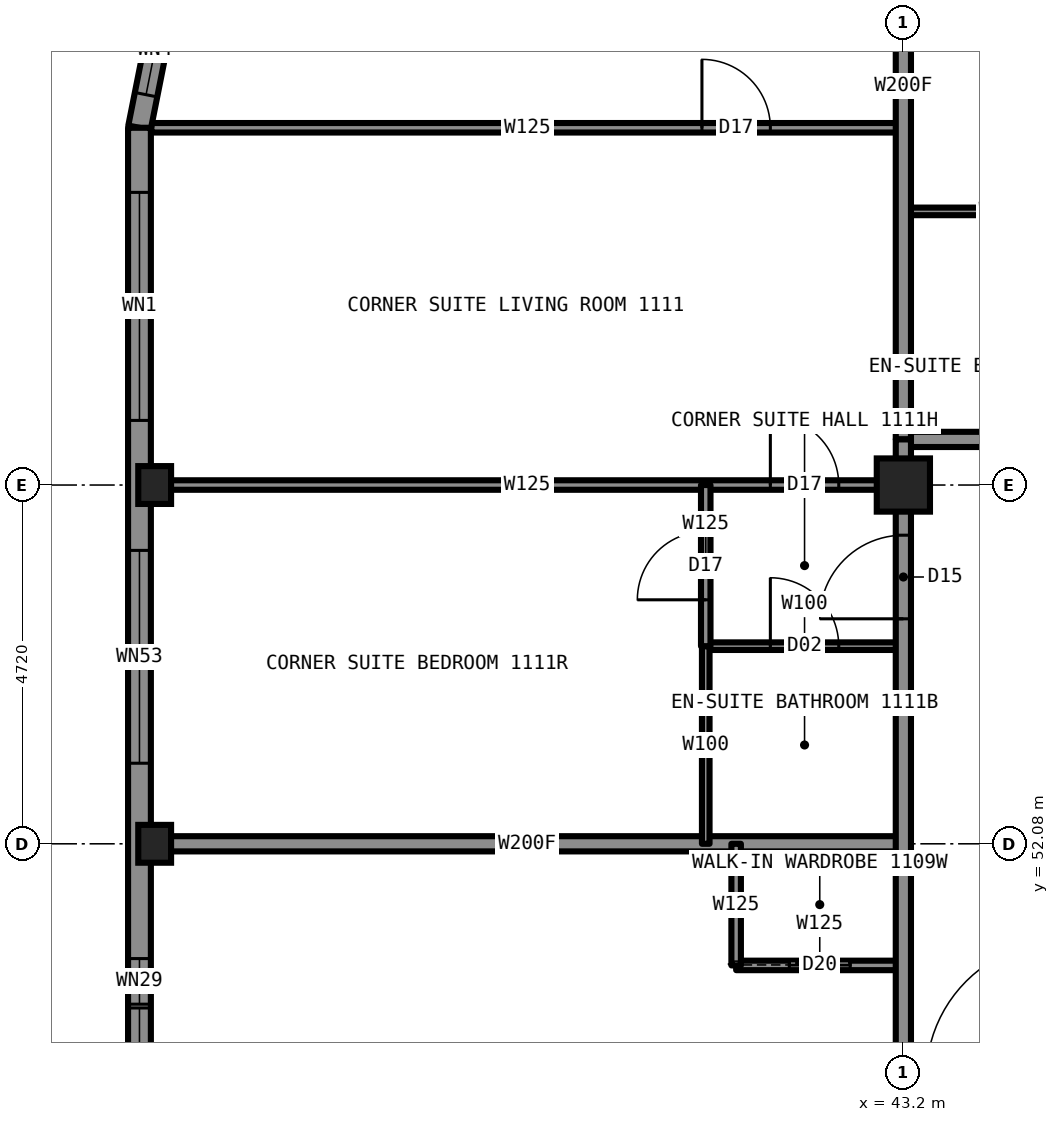
"""IFC4 building model, lengths in metres.
Left out: names, types, materials, properties, quantities, classifications, styles, units other than length and angle.
Written with IfcOpenShell. Run it as: python <this file> out.ifc"""

import sys

from ifc_helpers import new_model, si_unit, direction, frame, frame_2d, origin, origin_2d, place, context, subcontext, project, spatial, rectangle, hollow_rectangle, i_section, extrude, element, fill, save


model = new_model("IFC4")
c1 = context("Model", 3, precision=1e-05, world=origin(), true_north=direction((0.0, 1.0)))
c2 = subcontext(c1, "Body", "Model", "MODEL_VIEW")
j1 = project(units=[si_unit("LENGTHUNIT", "METRE"), si_unit("PLANEANGLEUNIT", "RADIAN")], contexts=[c1])
p1 = place(None, origin())
s1 = spatial("IfcSite", under=j1, at=p1, CompositionType="ELEMENT")
p2 = place(p1, origin())
s2 = spatial("IfcBuilding", under=s1, at=p2, CompositionType="ELEMENT")
p3 = place(p2, frame((0.0, 0.0, 39.0)))
s3 = spatial("IfcBuildingStorey", under=s2, at=p3, CompositionType="ELEMENT", Elevation=39.0)
for number, where, z_axis, x_axis in (
    (1, (33.35, 52.08, 0.0), (0.0, 0.0, 1.0), (1.0, 0.0, 0.0)),
    (2, (33.35, 56.8, 0.0), (0.0, 0.0, 1.0), (1.0, 0.0, 0.0)),
):
    element("IfcColumn", number, at=place(p3, frame(where, z_axis=z_axis, x_axis=x_axis)), inside=s3, PredefinedType="COLUMN", context=c2, shape_type="SweptSolid", body=[
        extrude(i_section(OverallWidth=0.432, OverallDepth=0.498, WebThickness=0.056, FlangeThickness=0.089, at=origin_2d()), origin(), (0.0, 0.0, 1.0), 3.5),
    ])
p4 = place(p3, frame((43.2, 56.8, 0.0), z_axis=(0.0, 0.0, 1.0), x_axis=(1.0, 0.0, 0.0)))
e3 = element("IfcColumn", 3, at=p4, inside=s3, PredefinedType="COLUMN", context=c2, shape_type="SweptSolid", body=[
    extrude(hollow_rectangle(XDim=0.7, YDim=0.7, WallThickness=0.06, at=origin_2d()), origin(), (0.0, 0.0, 1.0), 3.5),
])
p5 = place(p3, frame((33.3, 56.8, 0.0), z_axis=(0.0, 0.0, 1.0), x_axis=(1.0, 0.0, 0.0)))
e4 = element("IfcWall", 4, at=p5, inside=s3, PredefinedType="PARTITIONING", context=c2, shape_type="SweptSolid", body=[
    extrude(rectangle(XDim=9.9, YDim=0.125, at=frame_2d((4.95, 0.0))), origin(), (0.0, 0.0, 1.0), 2.573),
])
p6 = place(p5, frame((8.15, 0.0, 0.0)))
e5 = element("IfcOpeningElement", 5, at=p6, cuts=e4, PredefinedType="OPENING", context=c2, shape_type="SweptSolid", body=[
    extrude(rectangle(XDim=0.9, YDim=2.2, at=frame_2d((0.45, 1.1))), frame((0.0, 0.073, 0.0), z_axis=(0.0, -1.0, 0.0), x_axis=(1.0, 0.0, 0.0)), (0.0, 0.0, 1.0), 0.145),
])
p7 = place(p3, frame((43.2, 57.4, 0.0), z_axis=(0.0, 0.0, 1.0), x_axis=(1.0, 0.0, 0.0)))
e6 = element("IfcWall", 6, at=p7, inside=s3, PredefinedType="PARTITIONING", context=c2, shape_type="SweptSolid", body=[
    extrude(rectangle(XDim=23.6, YDim=0.2, at=frame_2d((11.8, 0.0))), origin(), (0.0, 0.0, 1.0), 3.33),
])
p8 = place(p7, frame((3.0, 0.0, 0.0)))
e7 = element("IfcOpeningElement", 7, at=p8, cuts=e6, PredefinedType="OPENING", context=c2, shape_type="SweptSolid", body=[
    extrude(rectangle(XDim=1.0, YDim=2.2, at=frame_2d((0.5, 1.1))), frame((0.0, 0.11, 0.0), z_axis=(0.0, -1.0, 0.0), x_axis=(1.0, 0.0, 0.0)), (0.0, 0.0, 1.0), 0.22),
])
p9 = place(p7, frame((11.29, 0.0, 0.0)))
e8 = element("IfcOpeningElement", 8, at=p9, cuts=e6, PredefinedType="OPENING", context=c2, shape_type="SweptSolid", body=[
    extrude(rectangle(XDim=1.1, YDim=2.2, at=frame_2d((0.55, 1.1))), frame((0.0, 0.11, 0.0), z_axis=(0.0, -1.0, 0.0), x_axis=(1.0, 0.0, 0.0)), (0.0, 0.0, 1.0), 0.22),
])
p10 = place(p3, frame((43.2, 60.4, 0.0), z_axis=(0.0, 0.0, 1.0), x_axis=(1.0, 0.0, 0.0)))
e9 = element("IfcWall", 9, at=p10, inside=s3, PredefinedType="PARTITIONING", context=c2, shape_type="SweptSolid", body=[
    extrude(rectangle(XDim=2.6, YDim=0.1, at=frame_2d((1.3, 0.0))), origin(), (0.0, 0.0, 1.0), 3.33),
])
p11 = place(p3, frame((33.306, 61.5, 0.0), z_axis=(0.0, 0.0, 1.0), x_axis=(1.0, 0.0, 0.0)))
e10 = element("IfcWall", 10, at=p11, inside=s3, PredefinedType="PARTITIONING", context=c2, shape_type="SweptSolid", body=[
    extrude(rectangle(XDim=9.894, YDim=0.125, at=frame_2d((4.947, 0.0))), origin(), (0.0, 0.0, 1.0), 3.33),
])
p12 = place(p11, frame((7.244, 0.0, 0.0)))
e11 = element("IfcOpeningElement", 11, at=p12, cuts=e10, PredefinedType="OPENING", context=c2, shape_type="SweptSolid", body=[
    extrude(rectangle(XDim=0.9, YDim=2.2, at=frame_2d((0.45, 1.1))), frame((0.0, 0.073, 0.0), z_axis=(0.0, -1.0, 0.0), x_axis=(1.0, 0.0, 0.0)), (0.0, 0.0, 1.0), 0.145),
])
p13 = place(p3, frame((41.0, 50.48, 0.0), z_axis=(0.0, 0.0, 1.0), x_axis=(1.0, 0.0, 0.0)))
e12 = element("IfcWall", 12, at=p13, inside=s3, PredefinedType="PARTITIONING", context=c2, shape_type="SweptSolid", body=[
    extrude(rectangle(XDim=2.2, YDim=0.125, at=frame_2d((1.1, 0.0))), origin(), (0.0, 0.0, 1.0), 3.33),
])
p14 = place(p13, frame((0.7, 0.0, 0.0)))
e13 = element("IfcOpeningElement", 13, at=p14, cuts=e12, PredefinedType="OPENING", context=c2, shape_type="SweptSolid", body=[
    extrude(rectangle(XDim=0.8, YDim=2.1, at=frame_2d((0.4, 1.05))), frame((0.0, 0.073, 0.0), z_axis=(0.0, -1.0, 0.0), x_axis=(1.0, 0.0, 0.0)), (0.0, 0.0, 1.0), 0.145),
])
p15 = place(p3, frame((33.3, 52.08, 0.0), z_axis=(0.0, 0.0, 1.0), x_axis=(1.0, 0.0, 0.0)))
e14 = element("IfcWall", 14, at=p15, inside=s3, PredefinedType="PARTITIONING", context=c2, shape_type="SweptSolid", body=[
    extrude(rectangle(XDim=9.9, YDim=0.2, at=frame_2d((4.95, 0.0))), origin(), (0.0, 0.0, 1.0), 2.573),
])
p16 = place(p3, frame((40.6, 54.68, 0.0), z_axis=(0.0, 0.0, 1.0), x_axis=(1.0, 0.0, 0.0)))
e15 = element("IfcWall", 15, at=p16, inside=s3, PredefinedType="PARTITIONING", context=c2, shape_type="SweptSolid", body=[
    extrude(rectangle(XDim=2.6, YDim=0.1, at=frame_2d((1.3, 0.0))), origin(), (0.0, 0.0, 1.0), 3.33),
])
p17 = place(p16, frame((0.85, 0.0, 0.0)))
e16 = element("IfcOpeningElement", 16, at=p17, cuts=e15, PredefinedType="OPENING", context=c2, shape_type="SweptSolid", body=[
    extrude(rectangle(XDim=0.9, YDim=2.1, at=frame_2d((0.45, 1.05))), frame((0.0, 0.06, 0.0), z_axis=(0.0, -1.0, 0.0), x_axis=(1.0, 0.0, 0.0)), (0.0, 0.0, 1.0), 0.12),
])
p18 = place(p3, frame((43.2, 33.2, 0.0), z_axis=(0.0, 0.0, 1.0), x_axis=(0.0, 1.0, 0.0)))
e17 = element("IfcWall", 17, at=p18, inside=s3, PredefinedType="PARTITIONING", context=c2, shape_type="SweptSolid", body=[
    extrude(rectangle(XDim=23.58, YDim=0.2, at=frame_2d((11.79, 0.0))), origin(), (0.0, 0.0, 1.0), 3.33),
])
p19 = place(p18, frame((7.27, 0.0, 0.0)))
e18 = element("IfcOpeningElement", 18, at=p19, cuts=e17, PredefinedType="OPENING", context=c2, shape_type="SweptSolid", body=[
    extrude(rectangle(XDim=1.0, YDim=2.2, at=frame_2d((0.5, 1.1))), frame((0.0, 0.11, 0.0), z_axis=(0.0, -1.0, 0.0), x_axis=(1.0, 0.0, 0.0)), (0.0, 0.0, 1.0), 0.22),
])
p20 = place(p18, frame((12.44, 0.0, 0.0)))
e19 = element("IfcOpeningElement", 19, at=p20, cuts=e17, PredefinedType="OPENING", context=c2, shape_type="SweptSolid", body=[
    extrude(rectangle(XDim=1.0, YDim=2.2, at=frame_2d((0.5, 1.1))), frame((0.0, 0.11, 0.0), z_axis=(0.0, -1.0, 0.0), x_axis=(1.0, 0.0, 0.0)), (0.0, 0.0, 1.0), 0.22),
])
p21 = place(p18, frame((21.84, 0.0, 0.0)))
e20 = element("IfcOpeningElement", 20, at=p21, cuts=e17, PredefinedType="OPENING", context=c2, shape_type="SweptSolid", body=[
    extrude(rectangle(XDim=1.1, YDim=2.2, at=frame_2d((0.55, 1.1))), frame((0.0, 0.11, 0.0), z_axis=(0.0, -1.0, 0.0), x_axis=(1.0, 0.0, 0.0)), (0.0, 0.0, 1.0), 0.22),
])
p22 = place(p18, frame((0.66, 0.0, 0.0)))
e21 = element("IfcOpeningElement", 21, at=p22, cuts=e17, PredefinedType="OPENING", context=c2, shape_type="SweptSolid", body=[
    extrude(rectangle(XDim=1.1, YDim=2.2, at=frame_2d((0.55, 1.1))), frame((0.0, 0.11, 0.0), z_axis=(0.0, -1.0, 0.0), x_axis=(1.0, 0.0, 0.0)), (0.0, 0.0, 1.0), 0.22),
])
p23 = place(p3, frame((43.2, 57.4, 0.0), z_axis=(0.0, 0.0, 1.0), x_axis=(0.0, 1.0, 0.0)))
e22 = element("IfcWall", 22, at=p23, inside=s3, PredefinedType="PARTITIONING", context=c2, shape_type="SweptSolid", body=[
    extrude(rectangle(XDim=9.3, YDim=0.2, at=frame_2d((4.65, 0.0))), origin(), (0.0, 0.0, 1.0), 2.573),
])
p24 = place(p3, frame((41.0, 50.48, 0.0), z_axis=(0.0, 0.0, 1.0), x_axis=(0.0, 1.0, 0.0)))
e23 = element("IfcWall", 23, at=p24, inside=s3, PredefinedType="PARTITIONING", context=c2, shape_type="SweptSolid", body=[
    extrude(rectangle(XDim=1.6, YDim=0.125, at=frame_2d((0.8, 0.0))), origin(), (0.0, 0.0, 1.0), 3.33),
])
p25 = place(p3, frame((40.6, 52.08, 0.0), z_axis=(0.0, 0.0, 1.0), x_axis=(0.0, 1.0, 0.0)))
e24 = element("IfcWall", 24, at=p25, inside=s3, PredefinedType="PARTITIONING", context=c2, shape_type="SweptSolid", body=[
    extrude(rectangle(XDim=2.6, YDim=0.1, at=frame_2d((1.3, 0.0))), origin(), (0.0, 0.0, 1.0), 3.33),
])
p26 = place(p3, frame((40.6, 54.68, 0.0), z_axis=(0.0, 0.0, 1.0), x_axis=(0.0, 1.0, 0.0)))
e25 = element("IfcWall", 25, at=p26, inside=s3, PredefinedType="PARTITIONING", context=c2, shape_type="SweptSolid", body=[
    extrude(rectangle(XDim=2.12, YDim=0.125, at=frame_2d((1.06, 0.0))), origin(), (0.0, 0.0, 1.0), 3.33),
])
p27 = place(p26, frame((0.61, 0.0, 0.0)))
e26 = element("IfcOpeningElement", 26, at=p27, cuts=e25, PredefinedType="OPENING", context=c2, shape_type="SweptSolid", body=[
    extrude(rectangle(XDim=0.9, YDim=2.2, at=frame_2d((0.45, 1.1))), frame((0.0, 0.073, 0.0), z_axis=(0.0, -1.0, 0.0), x_axis=(1.0, 0.0, 0.0)), (0.0, 0.0, 1.0), 0.145),
])
p28 = place(p3, frame((33.557, 63.547, 0.0), z_axis=(0.0, 0.0, 1.0), x_axis=(-0.195081421501, -0.980787050784, 0.0)))
e27 = element("IfcWall", 27, at=p28, inside=s3, PredefinedType="SOLIDWALL", context=c2, shape_type="SweptSolid", body=[
    extrude(rectangle(XDim=2.087, YDim=0.3, at=frame_2d((1.044, 0.0))), origin(), (0.0, 0.0, 1.0), 3.33),
])
p29 = place(p28, frame((0.444, 0.0, 0.5)))
e28 = element("IfcOpeningElement", 28, at=p29, cuts=e27, PredefinedType="OPENING", context=c2, shape_type="SweptSolid", body=[
    extrude(rectangle(XDim=1.2, YDim=2.0, at=frame_2d((0.6, 1.0))), frame((0.0, 0.16, 0.0), z_axis=(0.0, -1.0, 0.0), x_axis=(1.0, 0.0, 0.0)), (0.0, 0.0, 1.0), 0.32),
])
p30 = place(p3, frame((33.15, 61.5, 0.0), z_axis=(0.0, 0.0, 1.0), x_axis=(0.0, -1.0, 0.0)))
e29 = element("IfcWall", 29, at=p30, inside=s3, PredefinedType="SOLIDWALL", context=c2, shape_type="SweptSolid", body=[
    extrude(rectangle(XDim=33.0, YDim=0.3, at=frame_2d((16.5, 0.0))), origin(), (0.0, 0.0, 1.0), 2.83),
])
p31 = place(p30, frame((0.85, 0.0, 0.5)))
e30 = element("IfcOpeningElement", 30, at=p31, cuts=e29, PredefinedType="OPENING", context=c2, shape_type="SweptSolid", body=[
    extrude(rectangle(XDim=2.5, YDim=2.0, at=frame_2d((1.25, 1.0))), frame((0.0, 0.16, 0.0), z_axis=(0.0, -1.0, 0.0), x_axis=(1.0, 0.0, 0.0)), (0.0, 0.0, 1.0), 0.32),
])
p32 = place(p30, frame((6.61, 0.0, 0.5)))
e31 = element("IfcOpeningElement", 31, at=p32, cuts=e29, PredefinedType="OPENING", context=c2, shape_type="SweptSolid", body=[
    extrude(rectangle(XDim=1.9, YDim=1.9, at=frame_2d((0.95, 0.95))), frame((0.0, 0.16, 0.0), z_axis=(0.0, -1.0, 0.0), x_axis=(1.0, 0.0, 0.0)), (0.0, 0.0, 1.0), 0.32),
])
p33 = place(p30, frame((10.28, 0.0, 0.5)))
e32 = element("IfcOpeningElement", 32, at=p33, cuts=e29, PredefinedType="OPENING", context=c2, shape_type="SweptSolid", body=[
    extrude(rectangle(XDim=3.0, YDim=2.0, at=frame_2d((1.5, 1.0))), frame((0.0, 0.16, 0.0), z_axis=(0.0, -1.0, 0.0), x_axis=(1.0, 0.0, 0.0)), (0.0, 0.0, 1.0), 0.32),
])
p34 = place(p30, frame((15.0, 0.0, 0.5)))
e33 = element("IfcOpeningElement", 33, at=p34, cuts=e29, PredefinedType="OPENING", context=c2, shape_type="SweptSolid", body=[
    extrude(rectangle(XDim=3.0, YDim=2.0, at=frame_2d((1.5, 1.0))), frame((0.0, 0.16, 0.0), z_axis=(0.0, -1.0, 0.0), x_axis=(1.0, 0.0, 0.0)), (0.0, 0.0, 1.0), 0.32),
])
p35 = place(p30, frame((19.72, 0.0, 0.5)))
e34 = element("IfcOpeningElement", 34, at=p35, cuts=e29, PredefinedType="OPENING", context=c2, shape_type="SweptSolid", body=[
    extrude(rectangle(XDim=3.0, YDim=2.0, at=frame_2d((1.5, 1.0))), frame((0.0, 0.16, 0.0), z_axis=(0.0, -1.0, 0.0), x_axis=(1.0, 0.0, 0.0)), (0.0, 0.0, 1.0), 0.32),
])
p36 = place(p30, frame((24.44, 0.0, 0.5)))
e35 = element("IfcOpeningElement", 35, at=p36, cuts=e29, PredefinedType="OPENING", context=c2, shape_type="SweptSolid", body=[
    extrude(rectangle(XDim=1.9, YDim=1.9, at=frame_2d((0.95, 0.95))), frame((0.0, 0.16, 0.0), z_axis=(0.0, -1.0, 0.0), x_axis=(1.0, 0.0, 0.0)), (0.0, 0.0, 1.0), 0.32),
])
p37 = place(p30, frame((29.6, 0.0, 0.5)))
e36 = element("IfcOpeningElement", 36, at=p37, cuts=e29, PredefinedType="OPENING", context=c2, shape_type="SweptSolid", body=[
    extrude(rectangle(XDim=2.5, YDim=2.0, at=frame_2d((1.25, 1.0))), frame((0.0, 0.16, 0.0), z_axis=(0.0, -1.0, 0.0), x_axis=(1.0, 0.0, 0.0)), (0.0, 0.0, 1.0), 0.32),
])
p38 = place(p30, frame((5.91, 0.0, 0.5)))
e37 = element("IfcOpeningElement", 37, at=p38, cuts=e29, PredefinedType="OPENING", context=c2, shape_type="SweptSolid", body=[
    extrude(rectangle(XDim=0.7, YDim=1.0, at=frame_2d((0.35, 0.5))), frame((0.0, 0.16, 0.0), z_axis=(0.0, -1.0, 0.0), x_axis=(1.0, 0.0, 0.0)), (0.0, 0.0, 1.0), 0.32),
])
p39 = place(p30, frame((26.39, 0.0, 0.5)))
e38 = element("IfcOpeningElement", 38, at=p39, cuts=e29, PredefinedType="OPENING", context=c2, shape_type="SweptSolid", body=[
    extrude(rectangle(XDim=0.7, YDim=1.0, at=frame_2d((0.35, 0.5))), frame((0.0, 0.16, 0.0), z_axis=(0.0, -1.0, 0.0), x_axis=(1.0, 0.0, 0.0)), (0.0, 0.0, 1.0), 0.32),
])
p40 = place(p3, frame((43.2, 56.78, 0.0), z_axis=(0.0, 0.0, 1.0), x_axis=(0.0, 1.0, 0.0)))
e39 = element("IfcWall", 39, at=p40, inside=s3, PredefinedType="PARTITIONING", context=c2, shape_type="SweptSolid", body=[
    extrude(rectangle(XDim=0.62, YDim=0.2, at=frame_2d((0.31, 0.0))), origin(), (0.0, 0.0, 1.0), 2.573),
])
p41 = place(p14, origin())
e40 = element("IfcDoor", 40, at=p41, inside=s3, OperationType="SLIDING_TO_LEFT", PredefinedType="DOOR", context=c2, shape_type="SweptSolid", body=[
    extrude(rectangle(XDim=0.8, YDim=2.1, at=frame_2d((0.4, 1.05))), frame((0.0, 0.025, 0.0), z_axis=(0.0, -1.0, 0.0), x_axis=(1.0, 0.0, 0.0)), (0.0, 0.0, 1.0), 0.05),
])
fill(e13, e40)
p42 = place(p6, origin())
e41 = element("IfcDoor", 41, at=p42, inside=s3, OperationType="SINGLE_SWING_LEFT", PredefinedType="DOOR", context=c2, shape_type="SweptSolid", body=[
    extrude(rectangle(XDim=0.9, YDim=2.2, at=frame_2d((0.45, 1.1))), frame((0.0, 0.025, 0.0), z_axis=(0.0, -1.0, 0.0), x_axis=(1.0, 0.0, 0.0)), (0.0, 0.0, 1.0), 0.05),
])
fill(e5, e41)
p43 = place(p17, origin())
e42 = element("IfcDoor", 42, at=p43, inside=s3, OperationType="SINGLE_SWING_RIGHT", PredefinedType="DOOR", context=c2, shape_type="SweptSolid", body=[
    extrude(rectangle(XDim=0.9, YDim=2.1, at=frame_2d((0.45, 1.05))), frame((0.0, 0.025, 0.0), z_axis=(0.0, -1.0, 0.0), x_axis=(1.0, 0.0, 0.0)), (0.0, 0.0, 1.0), 0.05),
])
fill(e16, e42)
p44 = place(p21, origin())
e43 = element("IfcDoor", 43, at=p44, inside=s3, OperationType="SINGLE_SWING_LEFT", PredefinedType="DOOR", context=c2, shape_type="SweptSolid", body=[
    extrude(rectangle(XDim=1.1, YDim=2.2, at=frame_2d((0.55, 1.1))), frame((0.0, 0.025, 0.0), z_axis=(0.0, -1.0, 0.0), x_axis=(1.0, 0.0, 0.0)), (0.0, 0.0, 1.0), 0.05),
])
fill(e20, e43)
p45 = place(p12, origin())
e44 = element("IfcDoor", 44, at=p45, inside=s3, OperationType="SINGLE_SWING_LEFT", PredefinedType="DOOR", context=c2, shape_type="SweptSolid", body=[
    extrude(rectangle(XDim=0.9, YDim=2.2, at=frame_2d((0.45, 1.1))), frame((0.0, 0.025, 0.0), z_axis=(0.0, -1.0, 0.0), x_axis=(1.0, 0.0, 0.0)), (0.0, 0.0, 1.0), 0.05),
])
fill(e11, e44)
p46 = place(p27, origin())
e45 = element("IfcDoor", 45, at=p46, inside=s3, OperationType="SINGLE_SWING_LEFT", PredefinedType="DOOR", context=c2, shape_type="SweptSolid", body=[
    extrude(rectangle(XDim=0.9, YDim=2.2, at=frame_2d((0.45, 1.1))), frame((0.0, 0.025, 0.0), z_axis=(0.0, -1.0, 0.0), x_axis=(1.0, 0.0, 0.0)), (0.0, 0.0, 1.0), 0.05),
])
fill(e26, e45)
p47 = place(p29, origin())
e46 = element("IfcWindow", 46, at=p47, inside=s3, PartitioningType="SINGLE_PANEL", PredefinedType="WINDOW", context=c2, shape_type="SweptSolid", body=[
    extrude(rectangle(XDim=1.2, YDim=2.0, at=frame_2d((0.6, 1.0))), frame((0.0, 0.03, 0.0), z_axis=(0.0, -1.0, 0.0), x_axis=(1.0, 0.0, 0.0)), (0.0, 0.0, 1.0), 0.06),
])
fill(e28, e46)
p48 = place(p31, origin())
e47 = element("IfcWindow", 47, at=p48, inside=s3, PartitioningType="SINGLE_PANEL", PredefinedType="WINDOW", context=c2, shape_type="SweptSolid", body=[
    extrude(rectangle(XDim=2.5, YDim=2.0, at=frame_2d((1.25, 1.0))), frame((0.0, 0.03, 0.0), z_axis=(0.0, -1.0, 0.0), x_axis=(1.0, 0.0, 0.0)), (0.0, 0.0, 1.0), 0.06),
])
fill(e30, e47)
p49 = place(p32, origin())
e48 = element("IfcWindow", 48, at=p49, inside=s3, PartitioningType="SINGLE_PANEL", PredefinedType="WINDOW", context=c2, shape_type="SweptSolid", body=[
    extrude(rectangle(XDim=1.9, YDim=1.9, at=frame_2d((0.95, 0.95))), frame((0.0, 0.03, 0.0), z_axis=(0.0, -1.0, 0.0), x_axis=(1.0, 0.0, 0.0)), (0.0, 0.0, 1.0), 0.06),
])
fill(e31, e48)
p50 = place(p33, origin())
e49 = element("IfcWindow", 49, at=p50, inside=s3, PartitioningType="SINGLE_PANEL", PredefinedType="WINDOW", context=c2, shape_type="SweptSolid", body=[
    extrude(rectangle(XDim=3.0, YDim=2.0, at=frame_2d((1.5, 1.0))), frame((0.0, 0.03, 0.0), z_axis=(0.0, -1.0, 0.0), x_axis=(1.0, 0.0, 0.0)), (0.0, 0.0, 1.0), 0.06),
])
fill(e32, e49)
p51 = place(p38, origin())
e50 = element("IfcWindow", 50, at=p51, inside=s3, PartitioningType="SINGLE_PANEL", PredefinedType="WINDOW", context=c2, shape_type="SweptSolid", body=[
    extrude(rectangle(XDim=0.7, YDim=1.0, at=frame_2d((0.35, 0.5))), frame((0.0, 0.03, 0.0), z_axis=(0.0, -1.0, 0.0), x_axis=(1.0, 0.0, 0.0)), (0.0, 0.0, 1.0), 0.06),
])
fill(e37, e50)
save(model, sys.argv[1])
